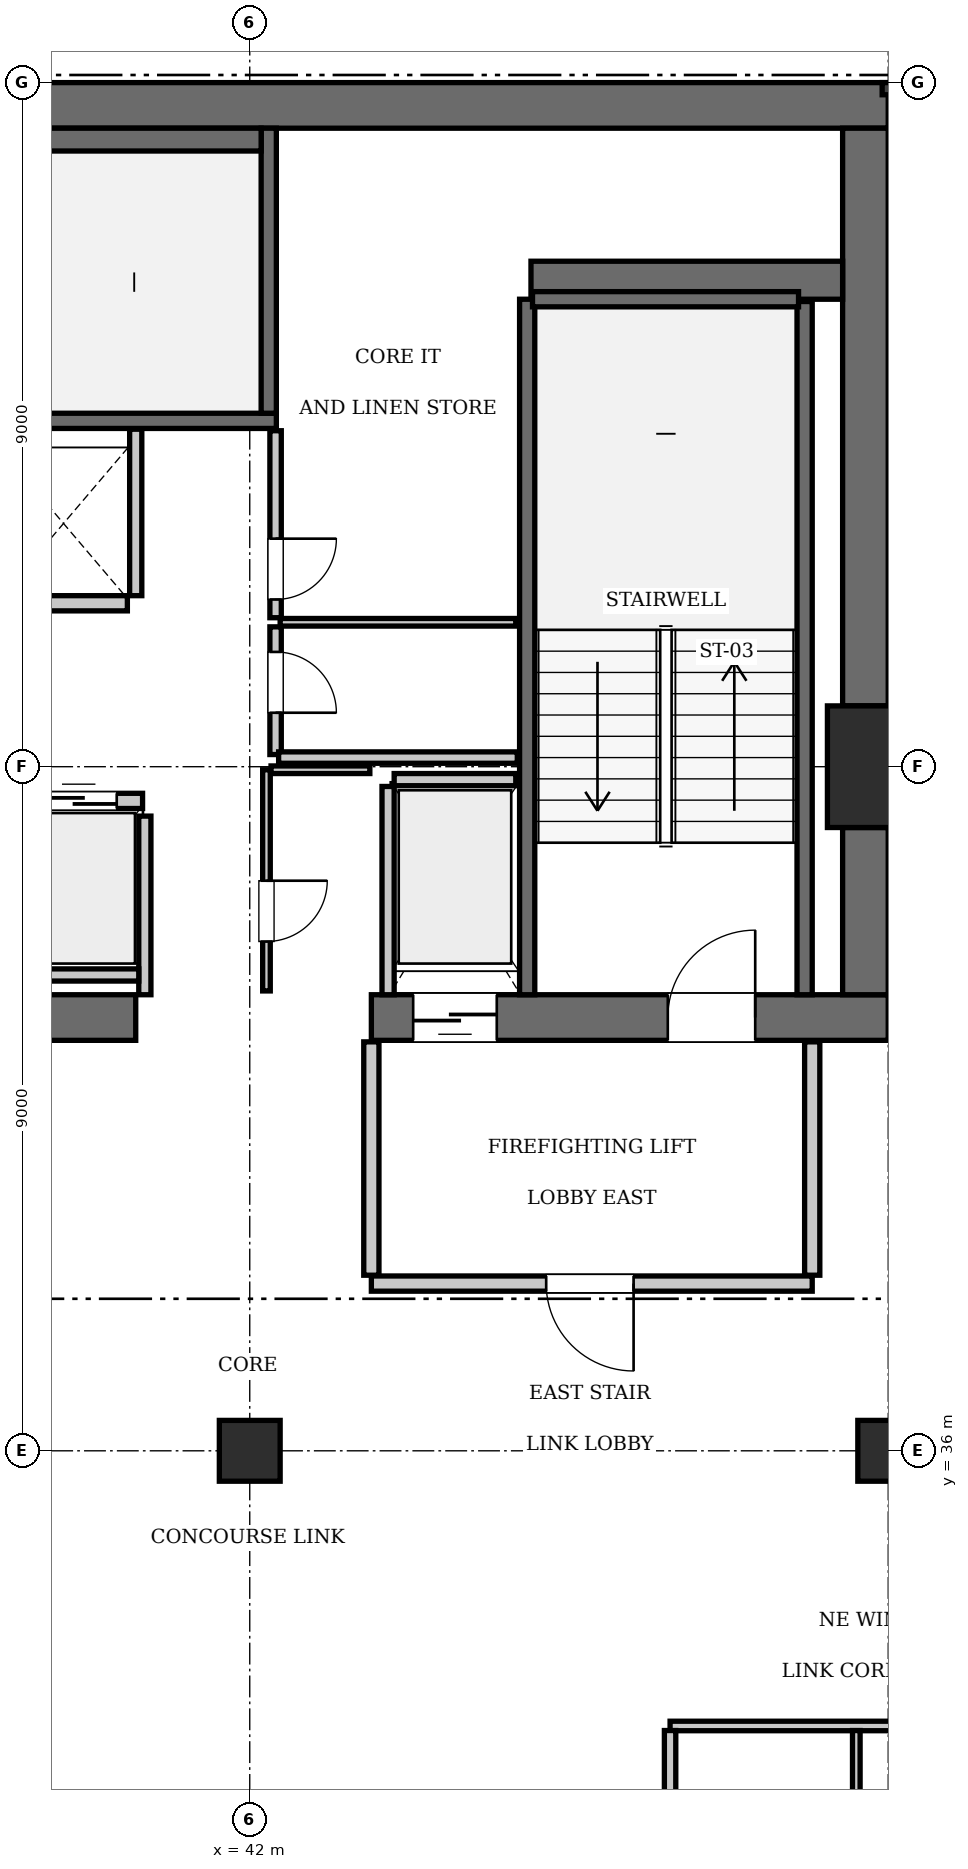
"""IFC4 building model, lengths in metres.
Left out: names, types, materials, properties, quantities, classifications, styles, units other than length and angle.
Written with IfcOpenShell. Run it as: python <this file> out.ifc"""

import sys

from ifc_helpers import new_model, si_unit, direction, frame, frame_2d, origin, origin_2d, place, context, subcontext, project, spatial, rectangle, extrude, element, fill, save


model = new_model("IFC4")
c1 = context("Model", 3, precision=1e-05, world=origin(), true_north=direction((0.0, 1.0)))
c2 = subcontext(c1, "Body", "Model", "MODEL_VIEW")
j1 = project(units=[si_unit("LENGTHUNIT", "METRE"), si_unit("PLANEANGLEUNIT", "RADIAN")], contexts=[c1])
p1 = place(None, origin())
s1 = spatial("IfcSite", under=j1, at=p1, CompositionType="ELEMENT")
p2 = place(p1, origin())
s2 = spatial("IfcBuilding", under=s1, at=p2, CompositionType="ELEMENT")
p3 = place(p2, frame((0.0, 0.0, 308.7)))
s3 = spatial("IfcBuildingStorey", under=s2, at=p3, CompositionType="ELEMENT", Elevation=308.7)
p4 = place(p3, frame((50.4, 45.0, 0.0), z_axis=(0.0, 0.0, 1.0), x_axis=(1.0, 0.0, 0.0)))
e1 = element("IfcColumn", 1, at=p4, inside=s3, PredefinedType="COLUMN", context=c2, shape_type="SweptSolid", body=[
    extrude(rectangle(XDim=1.6, YDim=1.6, at=origin_2d()), origin(), (0.0, 0.0, 1.0), 3.85),
])
p5 = place(p3, frame((25.2, 53.7, 0.0), z_axis=(0.0, 0.0, 1.0), x_axis=(1.0, 0.0, 0.0)))
e2 = element("IfcWall", 2, at=p5, inside=s3, PredefinedType="SHEAR", context=c2, shape_type="SweptSolid", body=[
    extrude(rectangle(XDim=25.2, YDim=0.6, at=frame_2d((12.6, 0.0))), origin(), (0.0, 0.0, 1.0), 3.85),
])
p6 = place(p3, frame((35.1, 41.7, 0.0), z_axis=(0.0, 0.0, 1.0), x_axis=(1.0, 0.0, 0.0)))
e3 = element("IfcWall", 3, at=p6, inside=s3, PredefinedType="SHEAR", context=c2, shape_type="SweptSolid", body=[
    extrude(rectangle(XDim=5.4, YDim=0.6, at=frame_2d((2.7, 0.0))), origin(), (0.0, 0.0, 1.0), 3.85),
])
p7 = place(p3, frame((43.6, 41.7, 0.0), z_axis=(0.0, 0.0, 1.0), x_axis=(1.0, 0.0, 0.0)))
e4 = element("IfcWall", 4, at=p7, inside=s3, PredefinedType="SHEAR", context=c2, shape_type="SweptSolid", body=[
    extrude(rectangle(XDim=6.8, YDim=0.6, at=frame_2d((3.4, 0.0))), origin(), (0.0, 0.0, 1.0), 3.85),
])
p8 = place(p7, frame((3.9, 0.0, 0.0)))
e5 = element("IfcOpeningElement", 5, at=p8, cuts=e4, PredefinedType="OPENING", context=c2, shape_type="SweptSolid", body=[
    extrude(rectangle(XDim=1.15, YDim=2.15, at=frame_2d((0.575, 1.075))), frame((0.0, 0.31, 0.0), z_axis=(0.0, -1.0, 0.0), x_axis=(1.0, 0.0, 0.0)), (0.0, 0.0, 1.0), 0.62),
])
p9 = place(p7, frame((0.55, 0.0, 0.0)))
e6 = element("IfcOpeningElement", 6, at=p9, cuts=e4, PredefinedType="OPENING", context=c2, shape_type="SweptSolid", body=[
    extrude(rectangle(XDim=1.1, YDim=2.2, at=frame_2d((0.55, 1.1))), frame((0.0, 0.31, 0.0), z_axis=(0.0, -1.0, 0.0), x_axis=(1.0, 0.0, 0.0)), (0.0, 0.0, 1.0), 0.62),
])
p10 = place(p3, frame((50.1, 42.0, 0.0), z_axis=(0.0, 0.0, 1.0), x_axis=(0.0, 1.0, 0.0)))
e7 = element("IfcWall", 7, at=p10, inside=s3, PredefinedType="SHEAR", context=c2, shape_type="SweptSolid", body=[
    extrude(rectangle(XDim=2.2, YDim=0.6, at=frame_2d((1.1, 0.0))), origin(), (0.0, 0.0, 1.0), 3.85),
])
p11 = place(p3, frame((50.1, 45.8, 0.0), z_axis=(0.0, 0.0, 1.0), x_axis=(0.0, 1.0, 0.0)))
e8 = element("IfcWall", 8, at=p11, inside=s3, PredefinedType="SHEAR", context=c2, shape_type="SweptSolid", body=[
    extrude(rectangle(XDim=7.6, YDim=0.6, at=frame_2d((3.8, 0.0))), origin(), (0.0, 0.0, 1.0), 3.85),
])
p12 = place(p3, frame((45.7, 51.4, 0.0), z_axis=(0.0, 0.0, 1.0), x_axis=(1.0, 0.0, 0.0)))
e9 = element("IfcWall", 9, at=p12, inside=s3, PredefinedType="SHEAR", context=c2, shape_type="SweptSolid", body=[
    extrude(rectangle(XDim=4.1, YDim=0.5, at=frame_2d((2.05, 0.0))), origin(), (0.0, 0.0, 1.0), 3.85),
])
for number, where, z_axis, x_axis in (
    (10, (42.0, 36.0, 0.0), (0.0, 0.0, 1.0), (1.0, 0.0, 0.0)),
    (11, (50.4, 36.0, 0.0), (0.0, 0.0, 1.0), (1.0, 0.0, 0.0)),
):
    element("IfcColumn", number, at=place(p3, frame(where, z_axis=z_axis, x_axis=x_axis)), inside=s3, PredefinedType="COLUMN", context=c2, shape_type="SweptSolid", body=[
        extrude(rectangle(XDim=0.8, YDim=0.8, at=origin_2d()), origin(), (0.0, 0.0, 1.0), 3.85),
    ])
p13 = place(p3, frame((33.25, 49.55, 0.0), z_axis=(0.0, 0.0, 1.0), x_axis=(1.0, 0.0, 0.0)))
e12 = element("IfcWall", 12, at=p13, inside=s3, PredefinedType="SOLIDWALL", context=c2, shape_type="SweptSolid", body=[
    extrude(rectangle(XDim=9.1, YDim=0.2, at=frame_2d((4.55, 0.0))), origin(), (0.0, 0.0, 1.0), 3.61),
])
p14 = place(p3, frame((42.25, 49.65, 0.0), z_axis=(0.0, 0.0, 1.0), x_axis=(0.0, 1.0, 0.0)))
e13 = element("IfcWall", 13, at=p14, inside=s3, PredefinedType="SOLIDWALL", context=c2, shape_type="SweptSolid", body=[
    extrude(rectangle(XDim=3.75, YDim=0.2, at=frame_2d((1.875, 0.0))), origin(), (0.0, 0.0, 1.0), 3.61),
])
p15 = place(p3, frame((33.45, 53.25, 0.0), z_axis=(0.0, 0.0, 1.0), x_axis=(1.0, 0.0, 0.0)))
e14 = element("IfcWall", 14, at=p15, inside=s3, PredefinedType="SOLIDWALL", context=c2, shape_type="SweptSolid", body=[
    extrude(rectangle(XDim=8.7, YDim=0.3, at=frame_2d((4.35, 0.0))), origin(), (0.0, 0.0, 1.0), 3.61),
])
p16 = place(p3, frame((45.65, 42.0, 0.0), z_axis=(0.0, 0.0, 1.0), x_axis=(0.0, 1.0, 0.0)))
e15 = element("IfcWall", 15, at=p16, inside=s3, PredefinedType="SOLIDWALL", context=c2, shape_type="SweptSolid", body=[
    extrude(rectangle(XDim=9.15, YDim=0.2, at=frame_2d((4.575, 0.0))), origin(), (0.0, 0.0, 1.0), 3.61),
])
p17 = place(p3, frame((49.3, 42.0, 0.0), z_axis=(0.0, 0.0, 1.0), x_axis=(0.0, 1.0, 0.0)))
e16 = element("IfcWall", 16, at=p17, inside=s3, PredefinedType="SOLIDWALL", context=c2, shape_type="SweptSolid", body=[
    extrude(rectangle(XDim=9.12, YDim=0.2, at=frame_2d((4.56, 0.0))), origin(), (0.0, 0.0, 1.0), 3.61),
])
p18 = place(p3, frame((45.72, 51.15, 0.0), z_axis=(0.0, 0.0, 1.0), x_axis=(1.0, 0.0, 0.0)))
e17 = element("IfcWall", 17, at=p18, inside=s3, PredefinedType="SOLIDWALL", context=c2, shape_type="SweptSolid", body=[
    extrude(rectangle(XDim=3.5, YDim=0.2, at=frame_2d((1.75, 0.0))), origin(), (0.0, 0.0, 1.0), 3.61),
])
p19 = place(p3, frame((38.91, 44.55, 0.0), z_axis=(0.0, 0.0, 1.0), x_axis=(1.0, 0.0, 0.0)))
e18 = element("IfcWall", 18, at=p19, inside=s3, PredefinedType="SOLIDWALL", context=c2, shape_type="SweptSolid", body=[
    extrude(rectangle(XDim=1.68, YDim=0.2, at=frame_2d((0.84, 0.0))), origin(), (0.0, 0.0, 1.0), 3.61),
])
p20 = place(p19, frame((0.34, 0.0, 0.0)))
e19 = element("IfcOpeningElement", 19, at=p20, cuts=e18, PredefinedType="OPENING", context=c2, shape_type="SweptSolid", body=[
    extrude(rectangle(XDim=1.0, YDim=2.15, at=frame_2d((0.5, 1.075))), frame((0.0, 0.11, 0.0), z_axis=(0.0, -1.0, 0.0), x_axis=(1.0, 0.0, 0.0)), (0.0, 0.0, 1.0), 0.22),
])
p21 = place(p3, frame((38.71, 47.15, 0.0), z_axis=(0.0, 0.0, 1.0), x_axis=(1.0, 0.0, 0.0)))
e20 = element("IfcWall", 20, at=p21, inside=s3, PredefinedType="SOLIDWALL", context=c2, shape_type="SweptSolid", body=[
    extrude(rectangle(XDim=1.68, YDim=0.2, at=frame_2d((0.84, 0.0))), origin(), (0.0, 0.0, 1.0), 3.61),
])
p22 = place(p3, frame((43.9, 44.83, 0.0), z_axis=(0.0, 0.0, 1.0), x_axis=(1.0, 0.0, 0.0)))
e21 = element("IfcWall", 21, at=p22, inside=s3, PredefinedType="SOLIDWALL", context=c2, shape_type="SweptSolid", body=[
    extrude(rectangle(XDim=1.6, YDim=0.16, at=frame_2d((0.8, 0.0))), origin(), (0.0, 0.0, 1.0), 3.61),
])
p23 = place(p3, frame((43.82, 42.0, 0.0), z_axis=(0.0, 0.0, 1.0), x_axis=(0.0, 1.0, 0.0)))
e22 = element("IfcWall", 22, at=p23, inside=s3, PredefinedType="SOLIDWALL", context=c2, shape_type="SweptSolid", body=[
    extrude(rectangle(XDim=2.74, YDim=0.16, at=frame_2d((1.37, 0.0))), origin(), (0.0, 0.0, 1.0), 3.61),
])
p24 = place(p3, frame((40.62, 42.0, 0.0), z_axis=(0.0, 0.0, 1.0), x_axis=(0.0, 1.0, 0.0)))
e23 = element("IfcWall", 23, at=p24, inside=s3, PredefinedType="SOLIDWALL", context=c2, shape_type="SweptSolid", body=[
    extrude(rectangle(XDim=2.35, YDim=0.16, at=frame_2d((1.175, 0.0))), origin(), (0.0, 0.0, 1.0), 3.61),
])
p25 = place(p3, frame((35.52, 42.26, 0.0), z_axis=(0.0, 0.0, 1.0), x_axis=(1.0, 0.0, 0.0)))
e24 = element("IfcWall", 24, at=p25, inside=s3, PredefinedType="SOLIDWALL", context=c2, shape_type="SweptSolid", body=[
    extrude(rectangle(XDim=5.02, YDim=0.16, at=frame_2d((2.51, 0.0))), origin(), (0.0, 0.0, 1.0), 3.61),
])
p26 = place(p3, frame((40.5, 47.25, 0.0), z_axis=(0.0, 0.0, 1.0), x_axis=(0.0, 1.0, 0.0)))
e25 = element("IfcWall", 25, at=p26, inside=s3, PredefinedType="SOLIDWALL", context=c2, shape_type="SweptSolid", body=[
    extrude(rectangle(XDim=2.19, YDim=0.16, at=frame_2d((1.095, 0.0))), origin(), (0.0, 0.0, 1.0), 3.61),
])
p27 = place(p3, frame((43.6, 38.2, 0.0), z_axis=(0.0, 0.0, 1.0), x_axis=(1.0, 0.0, 0.0)))
e26 = element("IfcWall", 26, at=p27, inside=s3, PredefinedType="PARTITIONING", context=c2, shape_type="SweptSolid", body=[
    extrude(rectangle(XDim=5.8, YDim=0.2, at=frame_2d((2.9, 0.0))), origin(), (0.0, 0.0, 1.0), 3.61),
])
p28 = place(p27, frame((2.3, 0.0, 0.0)))
e27 = element("IfcOpeningElement", 27, at=p28, cuts=e26, PredefinedType="OPENING", context=c2, shape_type="SweptSolid", body=[
    extrude(rectangle(XDim=1.15, YDim=2.15, at=frame_2d((0.575, 1.075))), frame((0.0, 0.11, 0.0), z_axis=(0.0, -1.0, 0.0), x_axis=(1.0, 0.0, 0.0)), (0.0, 0.0, 1.0), 0.22),
])
for number, where, z_axis, x_axis in (
    (28, (43.6, 38.31, 0.0), (0.0, 0.0, 1.0), (0.0, 1.0, 0.0)),
    (29, (49.4, 38.31, 0.0), (0.0, 0.0, 1.0), (0.0, 1.0, 0.0)),
):
    element("IfcWall", number, at=place(p3, frame(where, z_axis=z_axis, x_axis=x_axis)), inside=s3, PredefinedType="PARTITIONING", context=c2, shape_type="SweptSolid", body=[
        extrude(rectangle(XDim=3.07, YDim=0.2, at=frame_2d((1.535, 0.0))), origin(), (0.0, 0.0, 1.0), 3.61),
    ])
p29 = place(p3, frame((42.22, 42.05, 0.0), z_axis=(0.0, 0.0, 1.0), x_axis=(0.0, 1.0, 0.0)))
e30 = element("IfcWall", 30, at=p29, inside=s3, PredefinedType="PARTITIONING", context=c2, shape_type="SweptSolid", body=[
    extrude(rectangle(XDim=2.91, YDim=0.1, at=frame_2d((1.455, 0.0))), origin(), (0.0, 0.0, 1.0), 3.61),
])
p30 = place(p29, frame((0.65, 0.0, 0.0)))
e31 = element("IfcOpeningElement", 31, at=p30, cuts=e30, PredefinedType="OPENING", context=c2, shape_type="SweptSolid", body=[
    extrude(rectangle(XDim=0.8, YDim=2.05, at=frame_2d((0.4, 1.025))), frame((0.0, 0.06, 0.0), z_axis=(0.0, -1.0, 0.0), x_axis=(1.0, 0.0, 0.0)), (0.0, 0.0, 1.0), 0.12),
])
p31 = place(p3, frame((42.28, 44.96, 0.0), z_axis=(0.0, 0.0, 1.0), x_axis=(1.0, 0.0, 0.0)))
e32 = element("IfcWall", 32, at=p31, inside=s3, PredefinedType="PARTITIONING", context=c2, shape_type="SweptSolid", body=[
    extrude(rectangle(XDim=1.3, YDim=0.1, at=frame_2d((0.65, 0.0))), origin(), (0.0, 0.0, 1.0), 3.61),
])
p32 = place(p3, frame((42.34, 45.16, 0.0), z_axis=(0.0, 0.0, 1.0), x_axis=(0.0, 1.0, 0.0)))
e33 = element("IfcWall", 33, at=p32, inside=s3, PredefinedType="PARTITIONING", context=c2, shape_type="SweptSolid", body=[
    extrude(rectangle(XDim=1.68, YDim=0.15, at=frame_2d((0.84, 0.0))), origin(), (0.0, 0.0, 1.0), 3.61),
])
p33 = place(p32, frame((0.55, 0.0, 0.0)))
e34 = element("IfcOpeningElement", 34, at=p33, cuts=e33, PredefinedType="OPENING", context=c2, shape_type="SweptSolid", body=[
    extrude(rectangle(XDim=0.8, YDim=2.05, at=frame_2d((0.4, 1.025))), frame((0.0, 0.085, 0.0), z_axis=(0.0, -1.0, 0.0), x_axis=(1.0, 0.0, 0.0)), (0.0, 0.0, 1.0), 0.17),
])
p34 = place(p3, frame((42.34, 46.96, 0.0), z_axis=(0.0, 0.0, 1.0), x_axis=(0.0, 1.0, 0.0)))
e35 = element("IfcWall", 35, at=p34, inside=s3, PredefinedType="PARTITIONING", context=c2, shape_type="SweptSolid", body=[
    extrude(rectangle(XDim=2.46, YDim=0.15, at=frame_2d((1.23, 0.0))), origin(), (0.0, 0.0, 1.0), 3.61),
])
p35 = place(p34, frame((0.24, 0.0, 0.0)))
e36 = element("IfcOpeningElement", 36, at=p35, cuts=e35, PredefinedType="OPENING", context=c2, shape_type="SweptSolid", body=[
    extrude(rectangle(XDim=0.8, YDim=2.05, at=frame_2d((0.4, 1.025))), frame((0.0, 0.085, 0.0), z_axis=(0.0, -1.0, 0.0), x_axis=(1.0, 0.0, 0.0)), (0.0, 0.0, 1.0), 0.17),
])
p36 = place(p3, frame((42.4, 46.9, 0.0), z_axis=(0.0, 0.0, 1.0), x_axis=(1.0, 0.0, 0.0)))
e37 = element("IfcWall", 37, at=p36, inside=s3, PredefinedType="PARTITIONING", context=c2, shape_type="SweptSolid", body=[
    extrude(rectangle(XDim=3.1, YDim=0.1, at=frame_2d((1.55, 0.0))), origin(), (0.0, 0.0, 1.0), 3.61),
])
p37 = place(p3, frame((42.38, 45.12, 0.0), z_axis=(0.0, 0.0, 1.0), x_axis=(1.0, 0.0, 0.0)))
e38 = element("IfcWall", 38, at=p37, inside=s3, PredefinedType="PARTITIONING", context=c2, shape_type="SweptSolid", body=[
    extrude(rectangle(XDim=3.14, YDim=0.15, at=frame_2d((1.57, 0.0))), origin(), (0.0, 0.0, 1.0), 3.61),
])
p38 = place(p3, frame((47.53, 32.38, 0.0), z_axis=(0.0, 0.0, 1.0), x_axis=(1.0, 0.0, 0.0)))
e39 = element("IfcWall", 39, at=p38, inside=s3, PredefinedType="PARTITIONING", context=c2, shape_type="SweptSolid", body=[
    extrude(rectangle(XDim=12.57, YDim=0.125, at=frame_2d((6.285, 0.0))), origin(), (0.0, 0.0, 1.0), 3.61),
])
p39 = place(p3, frame((47.53, 30.43, 0.0), z_axis=(0.0, 0.0, 1.0), x_axis=(0.0, 1.0, 0.0)))
e40 = element("IfcWall", 40, at=p39, inside=s3, PredefinedType="PARTITIONING", context=c2, shape_type="SweptSolid", body=[
    extrude(rectangle(XDim=1.89, YDim=0.15, at=frame_2d((0.945, 0.0))), origin(), (0.0, 0.0, 1.0), 3.61),
])
p40 = place(p3, frame((49.98, 30.43, 0.0), z_axis=(0.0, 0.0, 1.0), x_axis=(0.0, 1.0, 0.0)))
e41 = element("IfcWall", 41, at=p40, inside=s3, PredefinedType="PARTITIONING", context=c2, shape_type="SweptSolid", body=[
    extrude(rectangle(XDim=1.89, YDim=0.1, at=frame_2d((0.945, 0.0))), origin(), (0.0, 0.0, 1.0), 3.61),
])
p41 = place(p8, origin())
e42 = element("IfcDoor", 42, at=p41, inside=s3, OperationType="SINGLE_SWING_RIGHT", PredefinedType="DOOR", context=c2, shape_type="SweptSolid", body=[
    extrude(rectangle(XDim=1.15, YDim=2.15, at=frame_2d((0.575, 1.075))), frame((0.0, 0.025, 0.0), z_axis=(0.0, -1.0, 0.0), x_axis=(1.0, 0.0, 0.0)), (0.0, 0.0, 1.0), 0.05),
])
fill(e5, e42)
p42 = place(p20, origin())
e43 = element("IfcDoor", 43, at=p42, inside=s3, OperationType="SLIDING_TO_LEFT", PredefinedType="DOOR", context=c2, shape_type="SweptSolid", body=[
    extrude(rectangle(XDim=1.0, YDim=2.15, at=frame_2d((0.5, 1.075))), frame((0.0, 0.025, 0.0), z_axis=(0.0, -1.0, 0.0), x_axis=(1.0, 0.0, 0.0)), (0.0, 0.0, 1.0), 0.05),
])
fill(e19, e43)
p43 = place(p9, frame((1.1, 0.0, 0.0), z_axis=(0.0, 0.0, 1.0), x_axis=(-1.0, 0.0, 0.0)))
e44 = element("IfcDoor", 44, at=p43, inside=s3, OperationType="SLIDING_TO_LEFT", PredefinedType="DOOR", context=c2, shape_type="SweptSolid", body=[
    extrude(rectangle(XDim=1.1, YDim=2.2, at=frame_2d((0.55, 1.1))), frame((0.0, 0.025, 0.0), z_axis=(0.0, -1.0, 0.0), x_axis=(1.0, 0.0, 0.0)), (0.0, 0.0, 1.0), 0.05),
])
fill(e6, e44)
p44 = place(p28, frame((1.15, 0.0, 0.0), z_axis=(0.0, 0.0, 1.0), x_axis=(-1.0, 0.0, 0.0)))
e45 = element("IfcDoor", 45, at=p44, inside=s3, OperationType="SINGLE_SWING_LEFT", PredefinedType="DOOR", context=c2, shape_type="SweptSolid", body=[
    extrude(rectangle(XDim=1.15, YDim=2.15, at=frame_2d((0.575, 1.075))), frame((0.0, 0.025, 0.0), z_axis=(0.0, -1.0, 0.0), x_axis=(1.0, 0.0, 0.0)), (0.0, 0.0, 1.0), 0.05),
])
fill(e27, e45)
p45 = place(p30, frame((0.8, 0.0, 0.0), z_axis=(0.0, 0.0, 1.0), x_axis=(-1.0, 0.0, 0.0)))
e46 = element("IfcDoor", 46, at=p45, inside=s3, OperationType="SINGLE_SWING_LEFT", PredefinedType="DOOR", context=c2, shape_type="SweptSolid", body=[
    extrude(rectangle(XDim=0.8, YDim=2.05, at=frame_2d((0.4, 1.025))), frame((0.0, 0.025, 0.0), z_axis=(0.0, -1.0, 0.0), x_axis=(1.0, 0.0, 0.0)), (0.0, 0.0, 1.0), 0.05),
])
fill(e31, e46)
p46 = place(p33, frame((0.8, 0.0, 0.0), z_axis=(0.0, 0.0, 1.0), x_axis=(-1.0, 0.0, 0.0)))
e47 = element("IfcDoor", 47, at=p46, inside=s3, OperationType="SINGLE_SWING_RIGHT", PredefinedType="DOOR", context=c2, shape_type="SweptSolid", body=[
    extrude(rectangle(XDim=0.8, YDim=2.05, at=frame_2d((0.4, 1.025))), frame((0.0, 0.025, 0.0), z_axis=(0.0, -1.0, 0.0), x_axis=(1.0, 0.0, 0.0)), (0.0, 0.0, 1.0), 0.05),
])
fill(e34, e47)
p47 = place(p35, frame((0.8, 0.0, 0.0), z_axis=(0.0, 0.0, 1.0), x_axis=(-1.0, 0.0, 0.0)))
e48 = element("IfcDoor", 48, at=p47, inside=s3, OperationType="SINGLE_SWING_LEFT", PredefinedType="DOOR", context=c2, shape_type="SweptSolid", body=[
    extrude(rectangle(XDim=0.8, YDim=2.05, at=frame_2d((0.4, 1.025))), frame((0.0, 0.025, 0.0), z_axis=(0.0, -1.0, 0.0), x_axis=(1.0, 0.0, 0.0)), (0.0, 0.0, 1.0), 0.05),
])
fill(e36, e48)
save(model, sys.argv[1])
